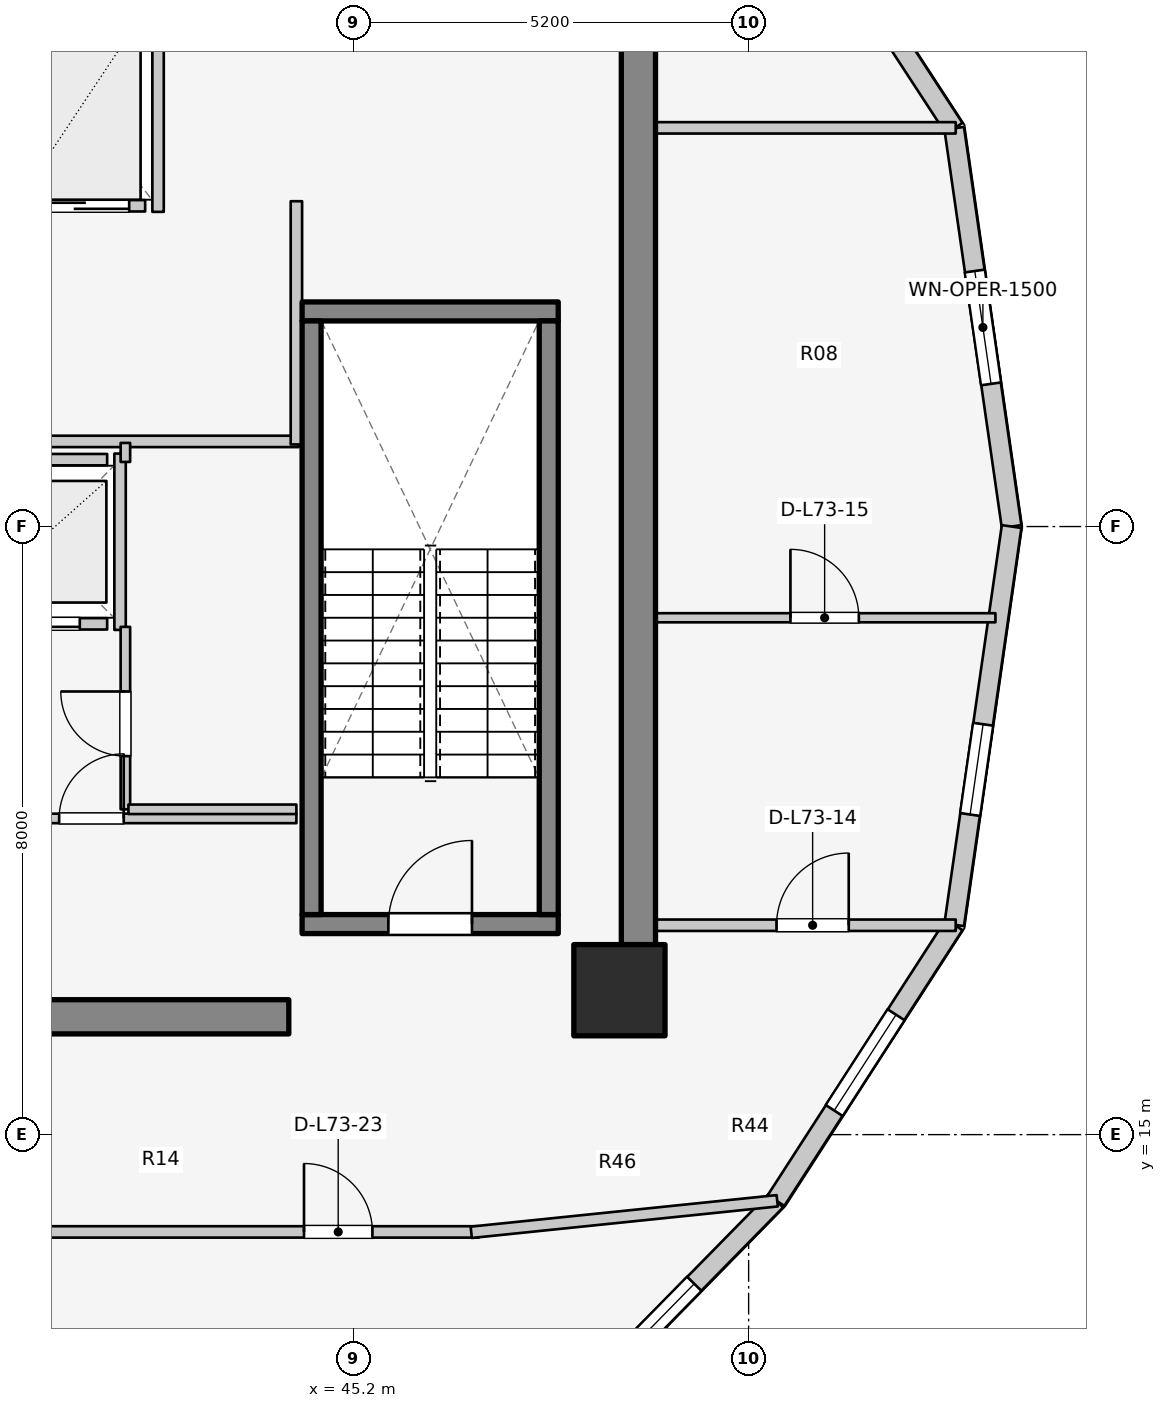
"""IFC4 building model, lengths in metres.
Left out: names, types, materials, properties, quantities, classifications, styles, units other than length and angle.
Written with IfcOpenShell. Run it as: python <this file> out.ifc"""

import sys

from ifc_helpers import new_model, si_unit, direction, frame, frame_2d, origin, origin_2d, place, context, subcontext, project, spatial, rectangle, extrude, element, fill, save


model = new_model("IFC4")
c1 = context("Model", 3, precision=1e-05, world=origin(), true_north=direction((0.0, 1.0)))
c2 = subcontext(c1, "Body", "Model", "MODEL_VIEW")
j1 = project(units=[si_unit("LENGTHUNIT", "METRE"), si_unit("PLANEANGLEUNIT", "RADIAN")], contexts=[c1])
p1 = place(None, origin())
s1 = spatial("IfcSite", under=j1, at=p1, CompositionType="ELEMENT")
p2 = place(p1, origin())
s2 = spatial("IfcBuilding", under=s1, at=p2, CompositionType="ELEMENT")
p3 = place(p2, frame((0.0, 0.0, 238.8)))
s3 = spatial("IfcBuildingStorey", under=s2, at=p3, CompositionType="ELEMENT", Elevation=238.8)
p4 = place(p3, frame((48.95, 17.05, 0.0), z_axis=(0.0, 0.0, 1.0), x_axis=(0.0, 1.0, 0.0)))
e1 = element("IfcWall", 1, at=p4, inside=s3, PredefinedType="SHEAR", context=c2, shape_type="SweptSolid", body=[
    extrude(rectangle(XDim=12.8, YDim=0.45, at=frame_2d((6.4, 0.0))), origin(), (0.0, 0.0, 1.0), 3.6),
])
p5 = place(p3, frame((39.85, 16.55, 0.0), z_axis=(0.0, 0.0, 1.0), x_axis=(1.0, 0.0, 0.0)))
e2 = element("IfcWall", 2, at=p5, inside=s3, PredefinedType="SHEAR", context=c2, shape_type="SweptSolid", body=[
    extrude(rectangle(XDim=4.5, YDim=0.45, at=frame_2d((2.25, 0.0))), origin(), (0.0, 0.0, 1.0), 3.6),
])
p6 = place(p3, frame((44.525, 17.77, 0.0), z_axis=(0.0, 0.0, 1.0), x_axis=(1.0, 0.0, 0.0)))
e3 = element("IfcWall", 3, at=p6, inside=s3, PredefinedType="SOLIDWALL", context=c2, shape_type="SweptSolid", body=[
    extrude(rectangle(XDim=3.37, YDim=0.25, at=frame_2d((1.685, 0.0))), origin(), (0.0, 0.0, 1.0), 3.6),
])
p7 = place(p6, frame((1.135, 0.0, 0.0)))
e4 = element("IfcOpeningElement", 4, at=p7, cuts=e3, PredefinedType="OPENING", context=c2, shape_type="SweptSolid", body=[
    extrude(rectangle(XDim=1.1, YDim=2.1, at=frame_2d((0.55, 1.05))), frame((0.0, 0.135, 0.0), z_axis=(0.0, -1.0, 0.0), x_axis=(1.0, 0.0, 0.0)), (0.0, 0.0, 1.0), 0.27),
])
p8 = place(p3, frame((44.525, 25.83, 0.0), z_axis=(0.0, 0.0, 1.0), x_axis=(1.0, 0.0, 0.0)))
e5 = element("IfcWall", 5, at=p8, inside=s3, PredefinedType="SOLIDWALL", context=c2, shape_type="SweptSolid", body=[
    extrude(rectangle(XDim=3.37, YDim=0.25, at=frame_2d((1.685, 0.0))), origin(), (0.0, 0.0, 1.0), 3.6),
])
for number, where, z_axis, x_axis in (
    (6, (44.65, 17.895, 0.0), (0.0, 0.0, 1.0), (0.0, 1.0, 0.0)),
    (7, (47.77, 17.895, 0.0), (0.0, 0.0, 1.0), (0.0, 1.0, 0.0)),
):
    element("IfcWall", number, at=place(p3, frame(where, z_axis=z_axis, x_axis=x_axis)), inside=s3, PredefinedType="SOLIDWALL", context=c2, shape_type="SweptSolid", body=[
        extrude(rectangle(XDim=7.81, YDim=0.25, at=frame_2d((3.905, 0.0))), origin(), (0.0, 0.0, 1.0), 3.6),
    ])
p9 = place(p3, frame((48.7, 16.9, 0.0), z_axis=(0.0, 0.0, 1.0), x_axis=(1.0, 0.0, 0.0)))
e8 = element("IfcColumn", 8, at=p9, inside=s3, PredefinedType="COLUMN", context=c2, shape_type="SweptSolid", body=[
    extrude(rectangle(XDim=1.2, YDim=1.2, at=origin_2d()), origin(), (0.0, 0.0, 1.0), 3.6),
])
p10 = place(p3, frame((53.86, 23.0, 0.0), z_axis=(0.0, 0.0, 1.0), x_axis=(-0.142712754019, 0.989764148593, 0.0)))
e9 = element("IfcWall", 9, at=p10, inside=s3, PredefinedType="STANDARD", context=c2, shape_type="SweptSolid", body=[
    extrude(rectangle(XDim=5.293, YDim=0.26, at=frame_2d((2.646, 0.0))), origin(), (0.0, 0.0, 1.0), 3.29),
])
p11 = place(p10, frame((1.896, 0.0, 0.75)))
e10 = element("IfcOpeningElement", 10, at=p11, cuts=e9, PredefinedType="OPENING", context=c2, shape_type="SweptSolid", body=[
    extrude(rectangle(XDim=1.5, YDim=1.6, at=frame_2d((0.75, 0.8))), frame((0.0, 0.14, 0.0), z_axis=(0.0, -1.0, 0.0), x_axis=(1.0, 0.0, 0.0)), (0.0, 0.0, 1.0), 0.28),
])
p12 = place(p3, frame((53.105, 28.239, 0.0), z_axis=(0.0, 0.0, 1.0), x_axis=(-0.546606419826, 0.837389647539, 0.0)))
e11 = element("IfcWall", 11, at=p12, inside=s3, PredefinedType="STANDARD", context=c2, shape_type="SweptSolid", body=[
    extrude(rectangle(XDim=4.288, YDim=0.26, at=frame_2d((2.144, 0.0))), origin(), (0.0, 0.0, 1.0), 3.29),
])
p13 = place(p12, frame((1.394, 0.0, 0.75)))
e12 = element("IfcOpeningElement", 12, at=p13, cuts=e11, PredefinedType="OPENING", context=c2, shape_type="SweptSolid", body=[
    extrude(rectangle(XDim=1.5, YDim=1.6, at=frame_2d((0.75, 0.8))), frame((0.0, 0.14, 0.0), z_axis=(0.0, -1.0, 0.0), x_axis=(1.0, 0.0, 0.0)), (0.0, 0.0, 1.0), 0.28),
])
p14 = place(p3, frame((47.558, 10.871, 0.0), z_axis=(0.0, 0.0, 1.0), x_axis=(0.700642973333, 0.713512034881, 0.0)))
e13 = element("IfcWall", 13, at=p14, inside=s3, PredefinedType="STANDARD", context=c2, shape_type="SweptSolid", body=[
    extrude(rectangle(XDim=4.572, YDim=0.26, at=frame_2d((2.286, 0.0))), origin(), (0.0, 0.0, 1.0), 3.29),
])
p15 = place(p14, frame((1.536, 0.0, 0.75)))
e14 = element("IfcOpeningElement", 14, at=p15, cuts=e13, PredefinedType="OPENING", context=c2, shape_type="SweptSolid", body=[
    extrude(rectangle(XDim=1.5, YDim=1.6, at=frame_2d((0.75, 0.8))), frame((0.0, 0.14, 0.0), z_axis=(0.0, -1.0, 0.0), x_axis=(1.0, 0.0, 0.0)), (0.0, 0.0, 1.0), 0.28),
])
p16 = place(p3, frame((50.761, 14.133, 0.0), z_axis=(0.0, 0.0, 1.0), x_axis=(0.542641766008, 0.839964233634, 0.0)))
e15 = element("IfcWall", 15, at=p16, inside=s3, PredefinedType="STANDARD", context=c2, shape_type="SweptSolid", body=[
    extrude(rectangle(XDim=4.319, YDim=0.26, at=frame_2d((2.16, 0.0))), origin(), (0.0, 0.0, 1.0), 3.29),
])
p17 = place(p16, frame((1.41, 0.0, 0.75)))
e16 = element("IfcOpeningElement", 16, at=p17, cuts=e15, PredefinedType="OPENING", context=c2, shape_type="SweptSolid", body=[
    extrude(rectangle(XDim=1.5, YDim=1.6, at=frame_2d((0.75, 0.8))), frame((0.0, 0.14, 0.0), z_axis=(0.0, -1.0, 0.0), x_axis=(1.0, 0.0, 0.0)), (0.0, 0.0, 1.0), 0.28),
])
p18 = place(p3, frame((53.105, 17.761, 0.0), z_axis=(0.0, 0.0, 1.0), x_axis=(0.142712754019, 0.989764148593, 0.0)))
e17 = element("IfcWall", 17, at=p18, inside=s3, PredefinedType="STANDARD", context=c2, shape_type="SweptSolid", body=[
    extrude(rectangle(XDim=5.293, YDim=0.26, at=frame_2d((2.646, 0.0))), origin(), (0.0, 0.0, 1.0), 3.29),
])
p19 = place(p18, frame((1.465, 0.0, 0.75)))
e18 = element("IfcOpeningElement", 18, at=p19, cuts=e17, PredefinedType="OPENING", context=c2, shape_type="SweptSolid", body=[
    extrude(rectangle(XDim=1.2, YDim=1.5, at=frame_2d((0.6, 0.75))), frame((0.0, 0.14, 0.0), z_axis=(0.0, -1.0, 0.0), x_axis=(1.0, 0.0, 0.0)), (0.0, 0.0, 1.0), 0.28),
])
p20 = place(p3, frame((40.14, 21.72, 0.0), z_axis=(0.0, 0.0, 1.0), x_axis=(1.0, 0.0, 0.0)))
e19 = element("IfcWall", 19, at=p20, inside=s3, PredefinedType="SOLIDWALL", context=c2, shape_type="SweptSolid", body=[
    extrude(rectangle(XDim=1.82, YDim=0.15, at=frame_2d((0.91, 0.0))), origin(), (0.0, 0.0, 1.0), 2.62),
])
p21 = place(p20, frame((0.36, 0.0, 0.0)))
e20 = element("IfcOpeningElement", 20, at=p21, cuts=e19, PredefinedType="OPENING", context=c2, shape_type="SweptSolid", body=[
    extrude(rectangle(XDim=1.1, YDim=2.1, at=frame_2d((0.55, 1.05))), frame((0.0, 0.085, 0.0), z_axis=(0.0, -1.0, 0.0), x_axis=(1.0, 0.0, 0.0)), (0.0, 0.0, 1.0), 0.17),
])
p22 = place(p3, frame((40.14, 23.88, 0.0), z_axis=(0.0, 0.0, 1.0), x_axis=(1.0, 0.0, 0.0)))
e21 = element("IfcWall", 21, at=p22, inside=s3, PredefinedType="SOLIDWALL", context=c2, shape_type="SweptSolid", body=[
    extrude(rectangle(XDim=1.82, YDim=0.15, at=frame_2d((0.91, 0.0))), origin(), (0.0, 0.0, 1.0), 2.62),
])
p23 = place(p3, frame((42.13, 21.64, 0.0), z_axis=(0.0, 0.0, 1.0), x_axis=(0.0, 1.0, 0.0)))
e22 = element("IfcWall", 22, at=p23, inside=s3, PredefinedType="SOLIDWALL", context=c2, shape_type="SweptSolid", body=[
    extrude(rectangle(XDim=2.32, YDim=0.15, at=frame_2d((1.16, 0.0))), origin(), (0.0, 0.0, 1.0), 3.295),
])
p24 = place(p3, frame((40.74, 27.22, 0.0), z_axis=(0.0, 0.0, 1.0), x_axis=(1.0, 0.0, 0.0)))
e23 = element("IfcWall", 23, at=p24, inside=s3, PredefinedType="SOLIDWALL", context=c2, shape_type="SweptSolid", body=[
    extrude(rectangle(XDim=1.72, YDim=0.15, at=frame_2d((0.86, 0.0))), origin(), (0.0, 0.0, 1.0), 3.295),
])
p25 = place(p24, frame((0.21, 0.0, 0.0)))
e24 = element("IfcOpeningElement", 24, at=p25, cuts=e23, PredefinedType="OPENING", context=c2, shape_type="SweptSolid", body=[
    extrude(rectangle(XDim=1.3, YDim=2.1, at=frame_2d((0.65, 1.05))), frame((0.0, 0.085, 0.0), z_axis=(0.0, -1.0, 0.0), x_axis=(1.0, 0.0, 0.0)), (0.0, 0.0, 1.0), 0.17),
])
p26 = place(p3, frame((42.63, 27.14, 0.0), z_axis=(0.0, 0.0, 1.0), x_axis=(0.0, 1.0, 0.0)))
e25 = element("IfcWall", 25, at=p26, inside=s3, PredefinedType="SOLIDWALL", context=c2, shape_type="SweptSolid", body=[
    extrude(rectangle(XDim=2.72, YDim=0.15, at=frame_2d((1.36, 0.0))), origin(), (0.0, 0.0, 1.0), 3.295),
])
p27 = place(p3, frame((39.4, 24.12, 0.0), z_axis=(0.0, 0.0, 1.0), x_axis=(1.0, 0.0, 0.0)))
e26 = element("IfcWall", 26, at=p27, inside=s3, PredefinedType="PARTITIONING", context=c2, shape_type="SweptSolid", body=[
    extrude(rectangle(XDim=5.08, YDim=0.15, at=frame_2d((2.54, 0.0))), origin(), (0.0, 0.0, 1.0), 2.62),
])
p28 = place(p3, frame((44.45, 24.08, 0.0), z_axis=(0.0, 0.0, 1.0), x_axis=(0.0, 1.0, 0.0)))
e27 = element("IfcWall", 27, at=p28, inside=s3, PredefinedType="PARTITIONING", context=c2, shape_type="SweptSolid", body=[
    extrude(rectangle(XDim=3.2, YDim=0.15, at=frame_2d((1.6, 0.0))), origin(), (0.0, 0.0, 1.0), 3.295),
])
p29 = place(p3, frame((39.58, 19.16, 0.0), z_axis=(0.0, 0.0, 1.0), x_axis=(1.0, 0.0, 0.0)))
e28 = element("IfcWall", 28, at=p29, inside=s3, PredefinedType="PARTITIONING", context=c2, shape_type="SweptSolid", body=[
    extrude(rectangle(XDim=4.87, YDim=0.125, at=frame_2d((2.435, 0.0))), origin(), (0.0, 0.0, 1.0), 2.62),
])
p30 = place(p29, frame((1.748, 0.0, 0.0)))
e29 = element("IfcOpeningElement", 29, at=p30, cuts=e28, PredefinedType="OPENING", context=c2, shape_type="SweptSolid", body=[
    extrude(rectangle(XDim=0.85, YDim=2.05, at=frame_2d((0.425, 1.025))), frame((0.0, 0.073, 0.0), z_axis=(0.0, -1.0, 0.0), x_axis=(1.0, 0.0, 0.0)), (0.0, 0.0, 1.0), 0.145),
])
p31 = place(p3, frame((42.2, 19.28, 0.0), z_axis=(0.0, 0.0, 1.0), x_axis=(0.0, 1.0, 0.0)))
e30 = element("IfcWall", 30, at=p31, inside=s3, PredefinedType="PARTITIONING", context=c2, shape_type="SweptSolid", body=[
    extrude(rectangle(XDim=2.4, YDim=0.125, at=frame_2d((1.2, 0.0))), origin(), (0.0, 0.0, 1.0), 3.295),
])
p32 = place(p31, frame((0.7, 0.0, 0.0)))
e31 = element("IfcOpeningElement", 31, at=p32, cuts=e30, PredefinedType="OPENING", context=c2, shape_type="SweptSolid", body=[
    extrude(rectangle(XDim=0.85, YDim=2.05, at=frame_2d((0.425, 1.025))), frame((0.0, 0.073, 0.0), z_axis=(0.0, -1.0, 0.0), x_axis=(1.0, 0.0, 0.0)), (0.0, 0.0, 1.0), 0.145),
])
p33 = place(p3, frame((42.2, 23.85, 0.0), z_axis=(0.0, 0.0, 1.0), x_axis=(0.0, 1.0, 0.0)))
e32 = element("IfcWall", 32, at=p33, inside=s3, PredefinedType="PARTITIONING", context=c2, shape_type="SweptSolid", body=[
    extrude(rectangle(XDim=0.25, YDim=0.125, at=frame_2d((0.125, 0.0))), origin(), (0.0, 0.0, 1.0), 3.295),
])
p34 = place(p3, frame((42.24, 19.28, 0.0), z_axis=(0.0, 0.0, 1.0), x_axis=(1.0, 0.0, 0.0)))
e33 = element("IfcWall", 33, at=p34, inside=s3, PredefinedType="PARTITIONING", context=c2, shape_type="SweptSolid", body=[
    extrude(rectangle(XDim=2.21, YDim=0.125, at=frame_2d((1.105, 0.0))), origin(), (0.0, 0.0, 1.0), 2.62),
])
p35 = place(p3, frame((48.95, 17.755, 0.0), z_axis=(0.0, 0.0, 1.0), x_axis=(1.0, 0.0, 0.0)))
e34 = element("IfcWall", 34, at=p35, inside=s3, PredefinedType="PARTITIONING", context=c2, shape_type="SweptSolid", body=[
    extrude(rectangle(XDim=4.175, YDim=0.15, at=frame_2d((2.087, 0.0))), origin(), (0.0, 0.0, 1.0), 3.295),
])
p36 = place(p35, frame((1.817, 0.0, 0.0)))
e35 = element("IfcOpeningElement", 35, at=p36, cuts=e34, PredefinedType="OPENING", context=c2, shape_type="SweptSolid", body=[
    extrude(rectangle(XDim=0.95, YDim=2.1, at=frame_2d((0.475, 1.05))), frame((0.0, 0.085, 0.0), z_axis=(0.0, -1.0, 0.0), x_axis=(1.0, 0.0, 0.0)), (0.0, 0.0, 1.0), 0.17),
])
p37 = place(p3, frame((48.95, 28.245, 0.0), z_axis=(0.0, 0.0, 1.0), x_axis=(1.0, 0.0, 0.0)))
e36 = element("IfcWall", 36, at=p37, inside=s3, PredefinedType="PARTITIONING", context=c2, shape_type="SweptSolid", body=[
    extrude(rectangle(XDim=4.175, YDim=0.15, at=frame_2d((2.087, 0.0))), origin(), (0.0, 0.0, 1.0), 3.295),
])
p38 = place(p3, frame((48.95, 21.8, 0.0), z_axis=(0.0, 0.0, 1.0), x_axis=(1.0, 0.0, 0.0)))
e37 = element("IfcWall", 37, at=p38, inside=s3, PredefinedType="MOVABLE", context=c2, shape_type="SweptSolid", body=[
    extrude(rectangle(XDim=4.697, YDim=0.12, at=frame_2d((2.349, 0.0))), origin(), (0.0, 0.0, 1.0), 3.295),
])
p39 = place(p38, frame((2.0, 0.0, 0.0)))
e38 = element("IfcOpeningElement", 38, at=p39, cuts=e37, PredefinedType="OPENING", context=c2, shape_type="SweptSolid", body=[
    extrude(rectangle(XDim=0.9, YDim=2.1, at=frame_2d((0.45, 1.05))), frame((0.0, 0.07, 0.0), z_axis=(0.0, -1.0, 0.0), x_axis=(1.0, 0.0, 0.0)), (0.0, 0.0, 1.0), 0.14),
])
p40 = place(p3, frame((39.33, 13.72, 0.0), z_axis=(0.0, 0.0, 1.0), x_axis=(1.0, 0.0, 0.0)))
e39 = element("IfcWall", 39, at=p40, inside=s3, PredefinedType="PARTITIONING", context=c2, shape_type="SweptSolid", body=[
    extrude(rectangle(XDim=7.52, YDim=0.15, at=frame_2d((3.76, 0.0))), origin(), (0.0, 0.0, 1.0), 2.816),
])
p41 = place(p40, frame((5.22, 0.0, 0.0)))
e40 = element("IfcOpeningElement", 40, at=p41, cuts=e39, PredefinedType="OPENING", context=c2, shape_type="SweptSolid", body=[
    extrude(rectangle(XDim=0.9, YDim=2.1, at=frame_2d((0.45, 1.05))), frame((0.0, 0.085, 0.0), z_axis=(0.0, -1.0, 0.0), x_axis=(1.0, 0.0, 0.0)), (0.0, 0.0, 1.0), 0.17),
])
p42 = place(p3, frame((46.75, 13.715, 0.0), z_axis=(0.0, 0.0, 1.0), x_axis=(0.994734711466, 0.102483431859, 0.0)))
e41 = element("IfcWall", 41, at=p42, inside=s3, PredefinedType="PARTITIONING", context=c2, shape_type="SweptSolid", body=[
    extrude(rectangle(XDim=4.047, YDim=0.15, at=frame_2d((2.024, 0.0))), origin(), (0.0, 0.0, 1.0), 2.66),
])
p43 = place(p3, frame((37.709, 12.463, 0.0), z_axis=(0.0, 0.0, 1.0), x_axis=(0.807095694912, -0.590420646027, 0.0)))
e42 = element("IfcWall", 42, at=p43, inside=s3, PredefinedType="MOVABLE", context=c2, shape_type="SweptSolid", body=[
    extrude(rectangle(XDim=7.119, YDim=0.12, at=frame_2d((3.56, 0.0))), origin(), (0.0, 0.0, 1.0), 2.66),
])
p44 = place(p11, origin())
e43 = element("IfcWindow", 43, at=p44, inside=s3, PartitioningType="SINGLE_PANEL", PredefinedType="WINDOW", context=c2, shape_type="SweptSolid", body=[
    extrude(rectangle(XDim=1.5, YDim=1.6, at=frame_2d((0.75, 0.8))), frame((0.0, 0.03, 0.0), z_axis=(0.0, -1.0, 0.0), x_axis=(1.0, 0.0, 0.0)), (0.0, 0.0, 1.0), 0.06),
])
fill(e10, e43)
p45 = place(p15, origin())
e44 = element("IfcWindow", 44, at=p45, inside=s3, PartitioningType="SINGLE_PANEL", PredefinedType="WINDOW", context=c2, shape_type="SweptSolid", body=[
    extrude(rectangle(XDim=1.5, YDim=1.6, at=frame_2d((0.75, 0.8))), frame((0.0, 0.03, 0.0), z_axis=(0.0, -1.0, 0.0), x_axis=(1.0, 0.0, 0.0)), (0.0, 0.0, 1.0), 0.06),
])
fill(e14, e44)
p46 = place(p17, origin())
e45 = element("IfcWindow", 45, at=p46, inside=s3, PartitioningType="SINGLE_PANEL", PredefinedType="WINDOW", context=c2, shape_type="SweptSolid", body=[
    extrude(rectangle(XDim=1.5, YDim=1.6, at=frame_2d((0.75, 0.8))), frame((0.0, 0.03, 0.0), z_axis=(0.0, -1.0, 0.0), x_axis=(1.0, 0.0, 0.0)), (0.0, 0.0, 1.0), 0.06),
])
fill(e16, e45)
p47 = place(p19, origin())
e46 = element("IfcWindow", 46, at=p47, inside=s3, PartitioningType="SINGLE_PANEL", PredefinedType="WINDOW", context=c2, shape_type="SweptSolid", body=[
    extrude(rectangle(XDim=1.2, YDim=1.5, at=frame_2d((0.6, 0.75))), frame((0.0, 0.03, 0.0), z_axis=(0.0, -1.0, 0.0), x_axis=(1.0, 0.0, 0.0)), (0.0, 0.0, 1.0), 0.06),
])
fill(e18, e46)
p48 = place(p7, origin())
e47 = element("IfcDoor", 47, at=p48, inside=s3, OperationType="SINGLE_SWING_RIGHT", PredefinedType="DOOR", context=c2, shape_type="SweptSolid", body=[
    extrude(rectangle(XDim=1.1, YDim=2.1, at=frame_2d((0.55, 1.05))), frame((0.0, 0.025, 0.0), z_axis=(0.0, -1.0, 0.0), x_axis=(1.0, 0.0, 0.0)), (0.0, 0.0, 1.0), 0.05),
])
fill(e4, e47)
p49 = place(p21, origin())
e48 = element("IfcDoor", 48, at=p49, inside=s3, OperationType="DOUBLE_DOOR_SLIDING", PredefinedType="DOOR", context=c2, shape_type="SweptSolid", body=[
    extrude(rectangle(XDim=1.1, YDim=2.1, at=frame_2d((0.55, 1.05))), frame((0.0, 0.025, 0.0), z_axis=(0.0, -1.0, 0.0), x_axis=(1.0, 0.0, 0.0)), (0.0, 0.0, 1.0), 0.05),
])
fill(e20, e48)
p50 = place(p25, origin())
e49 = element("IfcDoor", 49, at=p50, inside=s3, OperationType="DOUBLE_DOOR_SLIDING", PredefinedType="DOOR", context=c2, shape_type="SweptSolid", body=[
    extrude(rectangle(XDim=1.3, YDim=2.1, at=frame_2d((0.65, 1.05))), frame((0.0, 0.025, 0.0), z_axis=(0.0, -1.0, 0.0), x_axis=(1.0, 0.0, 0.0)), (0.0, 0.0, 1.0), 0.05),
])
fill(e24, e49)
p51 = place(p30, origin())
e50 = element("IfcDoor", 50, at=p51, inside=s3, OperationType="SINGLE_SWING_RIGHT", PredefinedType="DOOR", context=c2, shape_type="SweptSolid", body=[
    extrude(rectangle(XDim=0.85, YDim=2.05, at=frame_2d((0.425, 1.025))), frame((0.0, 0.025, 0.0), z_axis=(0.0, -1.0, 0.0), x_axis=(1.0, 0.0, 0.0)), (0.0, 0.0, 1.0), 0.05),
])
fill(e29, e50)
p52 = place(p32, origin())
e51 = element("IfcDoor", 51, at=p52, inside=s3, OperationType="SINGLE_SWING_RIGHT", PredefinedType="DOOR", context=c2, shape_type="SweptSolid", body=[
    extrude(rectangle(XDim=0.85, YDim=2.05, at=frame_2d((0.425, 1.025))), frame((0.0, 0.025, 0.0), z_axis=(0.0, -1.0, 0.0), x_axis=(1.0, 0.0, 0.0)), (0.0, 0.0, 1.0), 0.05),
])
fill(e31, e51)
p53 = place(p36, origin())
e52 = element("IfcDoor", 52, at=p53, inside=s3, OperationType="SINGLE_SWING_RIGHT", PredefinedType="DOOR", context=c2, shape_type="SweptSolid", body=[
    extrude(rectangle(XDim=0.95, YDim=2.1, at=frame_2d((0.475, 1.05))), frame((0.0, 0.025, 0.0), z_axis=(0.0, -1.0, 0.0), x_axis=(1.0, 0.0, 0.0)), (0.0, 0.0, 1.0), 0.05),
])
fill(e35, e52)
p54 = place(p39, origin())
e53 = element("IfcDoor", 53, at=p54, inside=s3, OperationType="SINGLE_SWING_LEFT", PredefinedType="DOOR", context=c2, shape_type="SweptSolid", body=[
    extrude(rectangle(XDim=0.9, YDim=2.1, at=frame_2d((0.45, 1.05))), frame((0.0, 0.025, 0.0), z_axis=(0.0, -1.0, 0.0), x_axis=(1.0, 0.0, 0.0)), (0.0, 0.0, 1.0), 0.05),
])
fill(e38, e53)
p55 = place(p41, origin())
e54 = element("IfcDoor", 54, at=p55, inside=s3, OperationType="SINGLE_SWING_LEFT", PredefinedType="DOOR", context=c2, shape_type="SweptSolid", body=[
    extrude(rectangle(XDim=0.9, YDim=2.1, at=frame_2d((0.45, 1.05))), frame((0.0, 0.025, 0.0), z_axis=(0.0, -1.0, 0.0), x_axis=(1.0, 0.0, 0.0)), (0.0, 0.0, 1.0), 0.05),
])
fill(e40, e54)
save(model, sys.argv[1])
